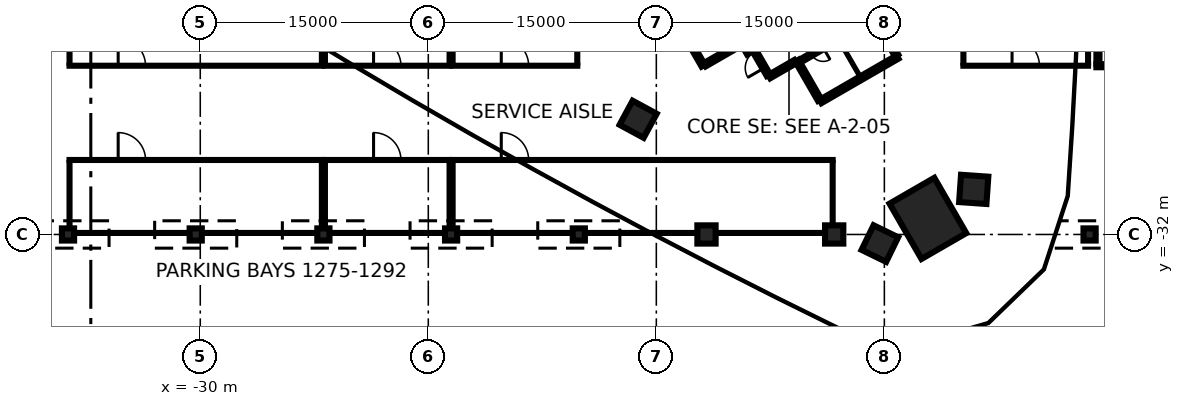
"""IFC4 building model, lengths in metres.
Left out: names, types, materials, properties, quantities, classifications, styles, units other than length and angle.
Written with IfcOpenShell. Run it as: python <this file> out.ifc"""

import sys

from ifc_helpers import new_model, si_unit, direction, frame, frame_2d, origin, origin_2d, place, context, subcontext, project, spatial, rectangle, extrude, element, fill, save


model = new_model("IFC4")
c1 = context("Model", 3, precision=1e-05, world=origin(), true_north=direction((0.0, 1.0)))
c2 = subcontext(c1, "Body", "Model", "MODEL_VIEW")
j1 = project(units=[si_unit("LENGTHUNIT", "METRE"), si_unit("PLANEANGLEUNIT", "RADIAN")], contexts=[c1])
p1 = place(None, origin())
s1 = spatial("IfcSite", under=j1, at=p1, CompositionType="ELEMENT")
p2 = place(p1, origin())
s2 = spatial("IfcBuilding", under=s1, at=p2, CompositionType="ELEMENT")
p3 = place(p2, frame((0.0, 0.0, -12.0)))
s3 = spatial("IfcBuildingStorey", under=s2, at=p3, CompositionType="ELEMENT", Elevation=-12.0)
p4 = place(p3, frame((17.865, -30.942, 0.0), z_axis=(0.0, 0.0, 1.0), x_axis=(-0.5, 0.866025403784, 0.0)))
e1 = element("IfcColumn", 1, at=p4, inside=s3, PredefinedType="COLUMN", context=c2, shape_type="SweptSolid", body=[
    extrude(rectangle(XDim=4.2, YDim=3.4, at=origin_2d()), origin(), (0.0, 0.0, 1.0), 4.4),
])
for number, where, z_axis, x_axis in (
    (2, (20.879, -29.034, 0.0), (0.0, 0.0, 1.0), (-0.998, 0.07, 0.0)),
    (3, (-1.197, -24.423, 0.0), (0.0, 0.0, 1.0), (0.476, 0.879, 0.0)),
    (4, (14.705, -32.599, 0.0), (0.0, 0.0, 1.0), (0.438, 0.899, 0.0)),
):
    element("IfcColumn", number, at=place(p3, frame(where, z_axis=z_axis, x_axis=x_axis)), inside=s3, PredefinedType="COLUMN", context=c2, shape_type="SweptSolid", body=[
        extrude(rectangle(XDim=1.8, YDim=1.8, at=origin_2d()), origin(), (0.0, 0.0, 1.0), 4.4),
    ])
for number, where, z_axis, x_axis in (
    (5, (-38.7, -32.0, 0.0), (0.0, 0.0, 1.0), (1.0, 0.0, 0.0)),
    (6, (-30.3, -32.0, 0.0), (0.0, 0.0, 1.0), (1.0, 0.0, 0.0)),
    (7, (-21.9, -32.0, 0.0), (0.0, 0.0, 1.0), (1.0, 0.0, 0.0)),
    (8, (-13.5, -32.0, 0.0), (0.0, 0.0, 1.0), (1.0, 0.0, 0.0)),
    (9, (-5.1, -32.0, 0.0), (0.0, 0.0, 1.0), (1.0, 0.0, 0.0)),
):
    element("IfcColumn", number, at=place(p3, frame(where, z_axis=z_axis, x_axis=x_axis)), inside=s3, PredefinedType="COLUMN", context=c2, shape_type="SweptSolid", body=[
        extrude(rectangle(XDim=0.8, YDim=0.8, at=origin_2d()), origin(), (0.0, 0.0, 1.0), 4.4),
    ])
for number, where, z_axis, x_axis in (
    (10, (3.3, -32.0, 0.0), (0.0, 0.0, 1.0), (1.0, 0.0, 0.0)),
    (11, (11.7, -32.0, 0.0), (0.0, 0.0, 1.0), (1.0, 0.0, 0.0)),
):
    element("IfcColumn", number, at=place(p3, frame(where, z_axis=z_axis, x_axis=x_axis)), inside=s3, PredefinedType="COLUMN", context=c2, shape_type="SweptSolid", body=[
        extrude(rectangle(XDim=1.2, YDim=1.2, at=origin_2d()), origin(), (0.0, 0.0, 1.0), 4.4),
    ])
p5 = place(p3, frame((28.5, -32.0, 0.0), z_axis=(0.0, 0.0, 1.0), x_axis=(1.0, 0.0, 0.0)))
e12 = element("IfcColumn", 12, at=p5, inside=s3, PredefinedType="COLUMN", context=c2, shape_type="SweptSolid", body=[
    extrude(rectangle(XDim=0.8, YDim=0.8, at=origin_2d()), origin(), (0.0, 0.0, 1.0), 4.4),
])
p6 = place(p3, frame((15.865, -20.328, 0.0), z_axis=(0.0, 0.0, 1.0), x_axis=(-0.86602852612, -0.499994591916, 0.0)))
e13 = element("IfcWall", 13, at=p6, inside=s3, PredefinedType="SHEAR", context=c2, shape_type="SweptSolid", body=[
    extrude(rectangle(XDim=5.85, YDim=0.25, at=frame_2d((2.925, 0.0))), origin(), (0.0, 0.0, 1.0), 4.4),
])
for number, where, z_axis, x_axis in (
    (14, (14.315, -17.644, 0.0), (0.0, 0.0, 1.0), (0.5, -0.866, 0.0)),
    (15, (10.736, -23.145, 0.0), (0.0, 0.0, 1.0), (-0.5, 0.866, 0.0)),
):
    element("IfcWall", number, at=place(p3, frame(where, z_axis=z_axis, x_axis=x_axis)), inside=s3, PredefinedType="SHEAR", context=c2, shape_type="SweptSolid", body=[
        extrude(rectangle(XDim=2.974, YDim=0.25, at=frame_2d((1.487, 0.0))), origin(), (0.0, 0.0, 1.0), 4.4),
    ])
p7 = place(p3, frame((3.085, -20.894, 0.0), z_axis=(0.0, 0.0, 1.0), x_axis=(-0.499978833458, 0.866037623948, 0.0)))
e16 = element("IfcWall", 16, at=p7, inside=s3, PredefinedType="SHEAR", context=c2, shape_type="SweptSolid", body=[
    extrude(rectangle(XDim=3.05, YDim=0.25, at=frame_2d((1.525, 0.0))), origin(), (0.0, 0.0, 1.0), 4.4),
])
p8 = place(p3, frame((5.675, -19.399, 0.0), z_axis=(0.0, 0.0, 1.0), x_axis=(-0.866026637627, -0.499997862916, 0.0)))
e17 = element("IfcWall", 17, at=p8, inside=s3, PredefinedType="SHEAR", context=c2, shape_type="SweptSolid", body=[
    extrude(rectangle(XDim=2.865, YDim=0.25, at=frame_2d((1.432, 0.0))), origin(), (0.0, 0.0, 1.0), 4.4),
])
p9 = place(p3, frame((9.14, -20.631, 0.0), z_axis=(0.0, 0.0, 1.0), x_axis=(-0.866043531843, -0.499968599967, 0.0)))
e18 = element("IfcWall", 18, at=p9, inside=s3, PredefinedType="SHEAR", context=c2, shape_type="SweptSolid", body=[
    extrude(rectangle(XDim=1.975, YDim=0.25, at=frame_2d((0.987, 0.0))), origin(), (0.0, 0.0, 1.0), 4.4),
])
p10 = place(p3, frame((7.367, -21.51, 0.0), z_axis=(0.0, 0.0, 1.0), x_axis=(-0.499983108224, 0.866035156036, 0.0)))
e19 = element("IfcWall", 19, at=p10, inside=s3, PredefinedType="SHEAR", context=c2, shape_type="SweptSolid", body=[
    extrude(rectangle(XDim=1.865, YDim=0.25, at=frame_2d((0.932, 0.0))), origin(), (0.0, 0.0, 1.0), 4.4),
])
p11 = place(p10, frame((0.535, 0.0, 0.0)))
e20 = element("IfcOpeningElement", 20, at=p11, cuts=e19, PredefinedType="OPENING", context=c2, shape_type="SweptSolid", body=[
    extrude(rectangle(XDim=1.25, YDim=2.1, at=frame_2d((0.625, 1.05))), frame((0.0, 0.135, 0.0), z_axis=(0.0, -1.0, 0.0), x_axis=(1.0, 0.0, 0.0)), (0.0, 0.0, 1.0), 0.27),
])
p12 = place(p3, frame((6.08, -20.1, 0.0), z_axis=(0.0, 0.0, 1.0), x_axis=(-0.500051773299, 0.865995510393, 0.0)))
e21 = element("IfcWall", 21, at=p12, inside=s3, PredefinedType="SHEAR", context=c2, shape_type="SweptSolid", body=[
    extrude(rectangle(XDim=0.685, YDim=0.25, at=frame_2d((0.342, 0.0))), origin(), (0.0, 0.0, 1.0), 4.4),
])
p13 = place(p3, frame((14.268, -17.815, 0.0), z_axis=(0.0, 0.0, 1.0), x_axis=(-0.866033794273, -0.499985466966, 0.0)))
e22 = element("IfcWall", 22, at=p13, inside=s3, PredefinedType="SHEAR", context=c2, shape_type="SweptSolid", body=[
    extrude(rectangle(XDim=5.598, YDim=0.2, at=frame_2d((2.799, 0.0))), origin(), (0.0, 0.0, 1.0), 4.4),
])
p14 = place(p13, frame((3.799, 0.0, 0.0)))
e23 = element("IfcOpeningElement", 23, at=p14, cuts=e22, PredefinedType="OPENING", context=c2, shape_type="SweptSolid", body=[
    extrude(rectangle(XDim=0.9, YDim=2.1, at=frame_2d((0.45, 1.05))), frame((0.0, 0.11, 0.0), z_axis=(0.0, -1.0, 0.0), x_axis=(1.0, 0.0, 0.0)), (0.0, 0.0, 1.0), 0.22),
])
p15 = place(p13, frame((0.799, 0.0, 0.0)))
e24 = element("IfcOpeningElement", 24, at=p15, cuts=e22, PredefinedType="OPENING", context=c2, shape_type="SweptSolid", body=[
    extrude(rectangle(XDim=0.8, YDim=2.1, at=frame_2d((0.4, 1.05))), frame((0.0, 0.11, 0.0), z_axis=(0.0, -1.0, 0.0), x_axis=(1.0, 0.0, 0.0)), (0.0, 0.0, 1.0), 0.22),
])
p16 = place(p3, frame((12.024, -19.227, 0.0), z_axis=(0.0, 0.0, 1.0), x_axis=(0.499988999718, -0.866031754707, 0.0)))
e25 = element("IfcWall", 25, at=p16, inside=s3, PredefinedType="PARTITIONING", context=c2, shape_type="SweptSolid", body=[
    extrude(rectangle(XDim=2.749, YDim=0.15, at=frame_2d((1.374, 0.0))), origin(), (0.0, 0.0, 1.0), 4.4),
])
p17 = place(p3, frame((-38.7, -31.9, 0.0), z_axis=(0.0, 0.0, 1.0), x_axis=(1.0, 0.0, 0.0)))
e26 = element("IfcWall", 26, at=p17, inside=s3, PredefinedType="PARTITIONING", context=c2, shape_type="SweptSolid", body=[
    extrude(rectangle(XDim=16.8, YDim=0.2, at=frame_2d((8.4, 0.0))), origin(), (0.0, 0.0, 1.0), 4.4),
])
p18 = place(p3, frame((-38.7, -27.1, 0.0), z_axis=(0.0, 0.0, 1.0), x_axis=(1.0, 0.0, 0.0)))
e27 = element("IfcWall", 27, at=p18, inside=s3, PredefinedType="PARTITIONING", context=c2, shape_type="SweptSolid", body=[
    extrude(rectangle(XDim=16.8, YDim=0.2, at=frame_2d((8.4, 0.0))), origin(), (0.0, 0.0, 1.0), 4.4),
])
p19 = place(p18, frame((3.3, 0.0, 0.0)))
e28 = element("IfcOpeningElement", 28, at=p19, cuts=e27, PredefinedType="OPENING", context=c2, shape_type="SweptSolid", body=[
    extrude(rectangle(XDim=1.8, YDim=2.1, at=frame_2d((0.9, 1.05))), frame((0.0, 0.11, 0.0), z_axis=(0.0, -1.0, 0.0), x_axis=(1.0, 0.0, 0.0)), (0.0, 0.0, 1.0), 0.22),
])
for number, where, z_axis, x_axis in (
    (29, (-38.6, -31.6, 0.0), (0.0, 0.0, 1.0), (0.0, 1.0, 0.0)),
    (30, (-22.0, -31.6, 0.0), (0.0, 0.0, 1.0), (0.0, 1.0, 0.0)),
):
    element("IfcWall", number, at=place(p3, frame(where, z_axis=z_axis, x_axis=x_axis)), inside=s3, PredefinedType="PARTITIONING", context=c2, shape_type="SweptSolid", body=[
        extrude(rectangle(XDim=4.4, YDim=0.2, at=frame_2d((2.2, 0.0))), origin(), (0.0, 0.0, 1.0), 4.4),
    ])
p20 = place(p3, frame((-21.9, -31.9, 0.0), z_axis=(0.0, 0.0, 1.0), x_axis=(1.0, 0.0, 0.0)))
e31 = element("IfcWall", 31, at=p20, inside=s3, PredefinedType="PARTITIONING", context=c2, shape_type="SweptSolid", body=[
    extrude(rectangle(XDim=8.4, YDim=0.2, at=frame_2d((4.2, 0.0))), origin(), (0.0, 0.0, 1.0), 4.4),
])
p21 = place(p3, frame((-21.9, -27.1, 0.0), z_axis=(0.0, 0.0, 1.0), x_axis=(1.0, 0.0, 0.0)))
e32 = element("IfcWall", 32, at=p21, inside=s3, PredefinedType="PARTITIONING", context=c2, shape_type="SweptSolid", body=[
    extrude(rectangle(XDim=8.4, YDim=0.2, at=frame_2d((4.2, 0.0))), origin(), (0.0, 0.0, 1.0), 4.4),
])
p22 = place(p21, frame((3.3, 0.0, 0.0)))
e33 = element("IfcOpeningElement", 33, at=p22, cuts=e32, PredefinedType="OPENING", context=c2, shape_type="SweptSolid", body=[
    extrude(rectangle(XDim=1.8, YDim=2.1, at=frame_2d((0.9, 1.05))), frame((0.0, 0.11, 0.0), z_axis=(0.0, -1.0, 0.0), x_axis=(1.0, 0.0, 0.0)), (0.0, 0.0, 1.0), 0.22),
])
for number, where, z_axis, x_axis in (
    (34, (-21.8, -31.6, 0.0), (0.0, 0.0, 1.0), (0.0, 1.0, 0.0)),
    (35, (-13.6, -31.6, 0.0), (0.0, 0.0, 1.0), (0.0, 1.0, 0.0)),
):
    element("IfcWall", number, at=place(p3, frame(where, z_axis=z_axis, x_axis=x_axis)), inside=s3, PredefinedType="PARTITIONING", context=c2, shape_type="SweptSolid", body=[
        extrude(rectangle(XDim=4.4, YDim=0.2, at=frame_2d((2.2, 0.0))), origin(), (0.0, 0.0, 1.0), 4.4),
    ])
p23 = place(p3, frame((-13.5, -31.9, 0.0), z_axis=(0.0, 0.0, 1.0), x_axis=(1.0, 0.0, 0.0)))
e36 = element("IfcWall", 36, at=p23, inside=s3, PredefinedType="PARTITIONING", context=c2, shape_type="SweptSolid", body=[
    extrude(rectangle(XDim=25.2, YDim=0.2, at=frame_2d((12.6, 0.0))), origin(), (0.0, 0.0, 1.0), 4.4),
])
p24 = place(p3, frame((-13.5, -27.1, 0.0), z_axis=(0.0, 0.0, 1.0), x_axis=(1.0, 0.0, 0.0)))
e37 = element("IfcWall", 37, at=p24, inside=s3, PredefinedType="PARTITIONING", context=c2, shape_type="SweptSolid", body=[
    extrude(rectangle(XDim=25.2, YDim=0.2, at=frame_2d((12.6, 0.0))), origin(), (0.0, 0.0, 1.0), 4.4),
])
p25 = place(p24, frame((3.3, 0.0, 0.0)))
e38 = element("IfcOpeningElement", 38, at=p25, cuts=e37, PredefinedType="OPENING", context=c2, shape_type="SweptSolid", body=[
    extrude(rectangle(XDim=1.8, YDim=2.1, at=frame_2d((0.9, 1.05))), frame((0.0, 0.11, 0.0), z_axis=(0.0, -1.0, 0.0), x_axis=(1.0, 0.0, 0.0)), (0.0, 0.0, 1.0), 0.22),
])
p26 = place(p3, frame((-13.4, -31.6, 0.0), z_axis=(0.0, 0.0, 1.0), x_axis=(0.0, 1.0, 0.0)))
e39 = element("IfcWall", 39, at=p26, inside=s3, PredefinedType="PARTITIONING", context=c2, shape_type="SweptSolid", body=[
    extrude(rectangle(XDim=4.4, YDim=0.2, at=frame_2d((2.2, 0.0))), origin(), (0.0, 0.0, 1.0), 4.4),
])
p27 = place(p3, frame((11.6, -31.4, 0.0), z_axis=(0.0, 0.0, 1.0), x_axis=(0.0, 1.0, 0.0)))
e40 = element("IfcWall", 40, at=p27, inside=s3, PredefinedType="PARTITIONING", context=c2, shape_type="SweptSolid", body=[
    extrude(rectangle(XDim=4.2, YDim=0.2, at=frame_2d((2.1, 0.0))), origin(), (0.0, 0.0, 1.0), 4.4),
])
p28 = place(p3, frame((-38.7, -20.9, 0.0), z_axis=(0.0, 0.0, 1.0), x_axis=(1.0, 0.0, 0.0)))
e41 = element("IfcWall", 41, at=p28, inside=s3, PredefinedType="PARTITIONING", context=c2, shape_type="SweptSolid", body=[
    extrude(rectangle(XDim=16.8, YDim=0.2, at=frame_2d((8.4, 0.0))), origin(), (0.0, 0.0, 1.0), 4.4),
])
p29 = place(p28, frame((3.3, 0.0, 0.0)))
e42 = element("IfcOpeningElement", 42, at=p29, cuts=e41, PredefinedType="OPENING", context=c2, shape_type="SweptSolid", body=[
    extrude(rectangle(XDim=1.8, YDim=2.1, at=frame_2d((0.9, 1.05))), frame((0.0, 0.11, 0.0), z_axis=(0.0, -1.0, 0.0), x_axis=(1.0, 0.0, 0.0)), (0.0, 0.0, 1.0), 0.22),
])
for number, where, z_axis, x_axis in (
    (43, (-38.6, -20.8, 0.0), (0.0, 0.0, 1.0), (0.0, 1.0, 0.0)),
    (44, (-22.0, -20.8, 0.0), (0.0, 0.0, 1.0), (0.0, 1.0, 0.0)),
):
    element("IfcWall", number, at=place(p3, frame(where, z_axis=z_axis, x_axis=x_axis)), inside=s3, PredefinedType="PARTITIONING", context=c2, shape_type="SweptSolid", body=[
        extrude(rectangle(XDim=4.2, YDim=0.2, at=frame_2d((2.1, 0.0))), origin(), (0.0, 0.0, 1.0), 4.4),
    ])
p30 = place(p3, frame((-21.9, -20.9, 0.0), z_axis=(0.0, 0.0, 1.0), x_axis=(1.0, 0.0, 0.0)))
e45 = element("IfcWall", 45, at=p30, inside=s3, PredefinedType="PARTITIONING", context=c2, shape_type="SweptSolid", body=[
    extrude(rectangle(XDim=8.4, YDim=0.2, at=frame_2d((4.2, 0.0))), origin(), (0.0, 0.0, 1.0), 4.4),
])
p31 = place(p30, frame((3.3, 0.0, 0.0)))
e46 = element("IfcOpeningElement", 46, at=p31, cuts=e45, PredefinedType="OPENING", context=c2, shape_type="SweptSolid", body=[
    extrude(rectangle(XDim=1.8, YDim=2.1, at=frame_2d((0.9, 1.05))), frame((0.0, 0.11, 0.0), z_axis=(0.0, -1.0, 0.0), x_axis=(1.0, 0.0, 0.0)), (0.0, 0.0, 1.0), 0.22),
])
for number, where, z_axis, x_axis in (
    (47, (-21.8, -20.8, 0.0), (0.0, 0.0, 1.0), (0.0, 1.0, 0.0)),
    (48, (-13.6, -20.8, 0.0), (0.0, 0.0, 1.0), (0.0, 1.0, 0.0)),
):
    element("IfcWall", number, at=place(p3, frame(where, z_axis=z_axis, x_axis=x_axis)), inside=s3, PredefinedType="PARTITIONING", context=c2, shape_type="SweptSolid", body=[
        extrude(rectangle(XDim=4.2, YDim=0.2, at=frame_2d((2.1, 0.0))), origin(), (0.0, 0.0, 1.0), 4.4),
    ])
p32 = place(p3, frame((-13.5, -20.9, 0.0), z_axis=(0.0, 0.0, 1.0), x_axis=(1.0, 0.0, 0.0)))
e49 = element("IfcWall", 49, at=p32, inside=s3, PredefinedType="PARTITIONING", context=c2, shape_type="SweptSolid", body=[
    extrude(rectangle(XDim=8.4, YDim=0.2, at=frame_2d((4.2, 0.0))), origin(), (0.0, 0.0, 1.0), 4.4),
])
p33 = place(p32, frame((3.3, 0.0, 0.0)))
e50 = element("IfcOpeningElement", 50, at=p33, cuts=e49, PredefinedType="OPENING", context=c2, shape_type="SweptSolid", body=[
    extrude(rectangle(XDim=1.8, YDim=2.1, at=frame_2d((0.9, 1.05))), frame((0.0, 0.11, 0.0), z_axis=(0.0, -1.0, 0.0), x_axis=(1.0, 0.0, 0.0)), (0.0, 0.0, 1.0), 0.22),
])
for number, where, z_axis, x_axis in (
    (51, (-13.4, -20.8, 0.0), (0.0, 0.0, 1.0), (0.0, 1.0, 0.0)),
    (52, (-5.2, -20.8, 0.0), (0.0, 0.0, 1.0), (0.0, 1.0, 0.0)),
):
    element("IfcWall", number, at=place(p3, frame(where, z_axis=z_axis, x_axis=x_axis)), inside=s3, PredefinedType="PARTITIONING", context=c2, shape_type="SweptSolid", body=[
        extrude(rectangle(XDim=4.2, YDim=0.2, at=frame_2d((2.1, 0.0))), origin(), (0.0, 0.0, 1.0), 4.4),
    ])
p34 = place(p3, frame((20.1, -20.9, 0.0), z_axis=(0.0, 0.0, 1.0), x_axis=(1.0, 0.0, 0.0)))
e53 = element("IfcWall", 53, at=p34, inside=s3, PredefinedType="PARTITIONING", context=c2, shape_type="SweptSolid", body=[
    extrude(rectangle(XDim=8.4, YDim=0.2, at=frame_2d((4.2, 0.0))), origin(), (0.0, 0.0, 1.0), 4.4),
])
p35 = place(p34, frame((3.3, 0.0, 0.0)))
e54 = element("IfcOpeningElement", 54, at=p35, cuts=e53, PredefinedType="OPENING", context=c2, shape_type="SweptSolid", body=[
    extrude(rectangle(XDim=1.8, YDim=2.1, at=frame_2d((0.9, 1.05))), frame((0.0, 0.11, 0.0), z_axis=(0.0, -1.0, 0.0), x_axis=(1.0, 0.0, 0.0)), (0.0, 0.0, 1.0), 0.22),
])
p36 = place(p3, frame((20.2, -20.8, 0.0), z_axis=(0.0, 0.0, 1.0), x_axis=(0.0, 1.0, 0.0)))
e55 = element("IfcWall", 55, at=p36, inside=s3, PredefinedType="PARTITIONING", context=c2, shape_type="SweptSolid", body=[
    extrude(rectangle(XDim=4.2, YDim=0.2, at=frame_2d((2.1, 0.0))), origin(), (0.0, 0.0, 1.0), 4.4),
])
p37 = place(p3, frame((28.4, -20.8, 0.0), z_axis=(0.0, 0.0, 1.0), x_axis=(0.0, 1.0, 0.0)))
e56 = element("IfcWall", 56, at=p37, inside=s3, PredefinedType="PARTITIONING", context=c2, shape_type="SweptSolid", body=[
    extrude(rectangle(XDim=4.4, YDim=0.2, at=frame_2d((2.2, 0.0))), origin(), (0.0, 0.0, 1.0), 4.4),
])
p38 = place(p3, frame((29.05, -20.8, 0.0), z_axis=(0.0, 0.0, 1.0), x_axis=(0.0, 1.0, 0.0)))
e57 = element("IfcWall", 57, at=p38, inside=s3, PredefinedType="SOLIDWALL", context=c2, shape_type="SweptSolid", body=[
    extrude(rectangle(XDim=9.6, YDim=0.2, at=frame_2d((4.8, 0.0))), origin(), (0.0, 0.0, 1.0), 4.4),
])
p39 = place(p3, frame((33.5, -20.9, 0.0), z_axis=(0.0, 0.0, 1.0), x_axis=(-1.0, 0.0, 0.0)))
e58 = element("IfcWall", 58, at=p39, inside=s3, PredefinedType="SOLIDWALL", context=c2, shape_type="SweptSolid", body=[
    extrude(rectangle(XDim=4.55, YDim=0.2, at=frame_2d((2.275, 0.0))), origin(), (0.0, 0.0, 1.0), 4.4),
])
p40 = place(p11, origin())
e59 = element("IfcDoor", 59, at=p40, inside=s3, OperationType="SINGLE_SWING_LEFT", PredefinedType="DOOR", context=c2, shape_type="SweptSolid", body=[
    extrude(rectangle(XDim=1.25, YDim=2.1, at=frame_2d((0.625, 1.05))), frame((0.0, 0.025, 0.0), z_axis=(0.0, -1.0, 0.0), x_axis=(1.0, 0.0, 0.0)), (0.0, 0.0, 1.0), 0.05),
])
fill(e20, e59)
p41 = place(p14, origin())
e60 = element("IfcDoor", 60, at=p41, inside=s3, OperationType="SINGLE_SWING_RIGHT", PredefinedType="DOOR", context=c2, shape_type="SweptSolid", body=[
    extrude(rectangle(XDim=0.9, YDim=2.1, at=frame_2d((0.45, 1.05))), frame((0.0, 0.025, 0.0), z_axis=(0.0, -1.0, 0.0), x_axis=(1.0, 0.0, 0.0)), (0.0, 0.0, 1.0), 0.05),
])
fill(e23, e60)
p42 = place(p19, origin())
e61 = element("IfcDoor", 61, at=p42, inside=s3, OperationType="DOUBLE_DOOR_SINGLE_SWING", PredefinedType="DOOR", context=c2, shape_type="SweptSolid", body=[
    extrude(rectangle(XDim=1.8, YDim=2.1, at=frame_2d((0.9, 1.05))), frame((0.0, 0.025, 0.0), z_axis=(0.0, -1.0, 0.0), x_axis=(1.0, 0.0, 0.0)), (0.0, 0.0, 1.0), 0.05),
])
fill(e28, e61)
p43 = place(p22, origin())
e62 = element("IfcDoor", 62, at=p43, inside=s3, OperationType="DOUBLE_DOOR_SINGLE_SWING", PredefinedType="DOOR", context=c2, shape_type="SweptSolid", body=[
    extrude(rectangle(XDim=1.8, YDim=2.1, at=frame_2d((0.9, 1.05))), frame((0.0, 0.025, 0.0), z_axis=(0.0, -1.0, 0.0), x_axis=(1.0, 0.0, 0.0)), (0.0, 0.0, 1.0), 0.05),
])
fill(e33, e62)
p44 = place(p25, origin())
e63 = element("IfcDoor", 63, at=p44, inside=s3, OperationType="DOUBLE_DOOR_SINGLE_SWING", PredefinedType="DOOR", context=c2, shape_type="SweptSolid", body=[
    extrude(rectangle(XDim=1.8, YDim=2.1, at=frame_2d((0.9, 1.05))), frame((0.0, 0.025, 0.0), z_axis=(0.0, -1.0, 0.0), x_axis=(1.0, 0.0, 0.0)), (0.0, 0.0, 1.0), 0.05),
])
fill(e38, e63)
p45 = place(p29, origin())
e64 = element("IfcDoor", 64, at=p45, inside=s3, OperationType="DOUBLE_DOOR_SINGLE_SWING", PredefinedType="DOOR", context=c2, shape_type="SweptSolid", body=[
    extrude(rectangle(XDim=1.8, YDim=2.1, at=frame_2d((0.9, 1.05))), frame((0.0, 0.025, 0.0), z_axis=(0.0, -1.0, 0.0), x_axis=(1.0, 0.0, 0.0)), (0.0, 0.0, 1.0), 0.05),
])
fill(e42, e64)
p46 = place(p31, origin())
e65 = element("IfcDoor", 65, at=p46, inside=s3, OperationType="DOUBLE_DOOR_SINGLE_SWING", PredefinedType="DOOR", context=c2, shape_type="SweptSolid", body=[
    extrude(rectangle(XDim=1.8, YDim=2.1, at=frame_2d((0.9, 1.05))), frame((0.0, 0.025, 0.0), z_axis=(0.0, -1.0, 0.0), x_axis=(1.0, 0.0, 0.0)), (0.0, 0.0, 1.0), 0.05),
])
fill(e46, e65)
p47 = place(p33, origin())
e66 = element("IfcDoor", 66, at=p47, inside=s3, OperationType="DOUBLE_DOOR_SINGLE_SWING", PredefinedType="DOOR", context=c2, shape_type="SweptSolid", body=[
    extrude(rectangle(XDim=1.8, YDim=2.1, at=frame_2d((0.9, 1.05))), frame((0.0, 0.025, 0.0), z_axis=(0.0, -1.0, 0.0), x_axis=(1.0, 0.0, 0.0)), (0.0, 0.0, 1.0), 0.05),
])
fill(e50, e66)
p48 = place(p35, origin())
e67 = element("IfcDoor", 67, at=p48, inside=s3, OperationType="DOUBLE_DOOR_SINGLE_SWING", PredefinedType="DOOR", context=c2, shape_type="SweptSolid", body=[
    extrude(rectangle(XDim=1.8, YDim=2.1, at=frame_2d((0.9, 1.05))), frame((0.0, 0.025, 0.0), z_axis=(0.0, -1.0, 0.0), x_axis=(1.0, 0.0, 0.0)), (0.0, 0.0, 1.0), 0.05),
])
fill(e54, e67)
save(model, sys.argv[1])
